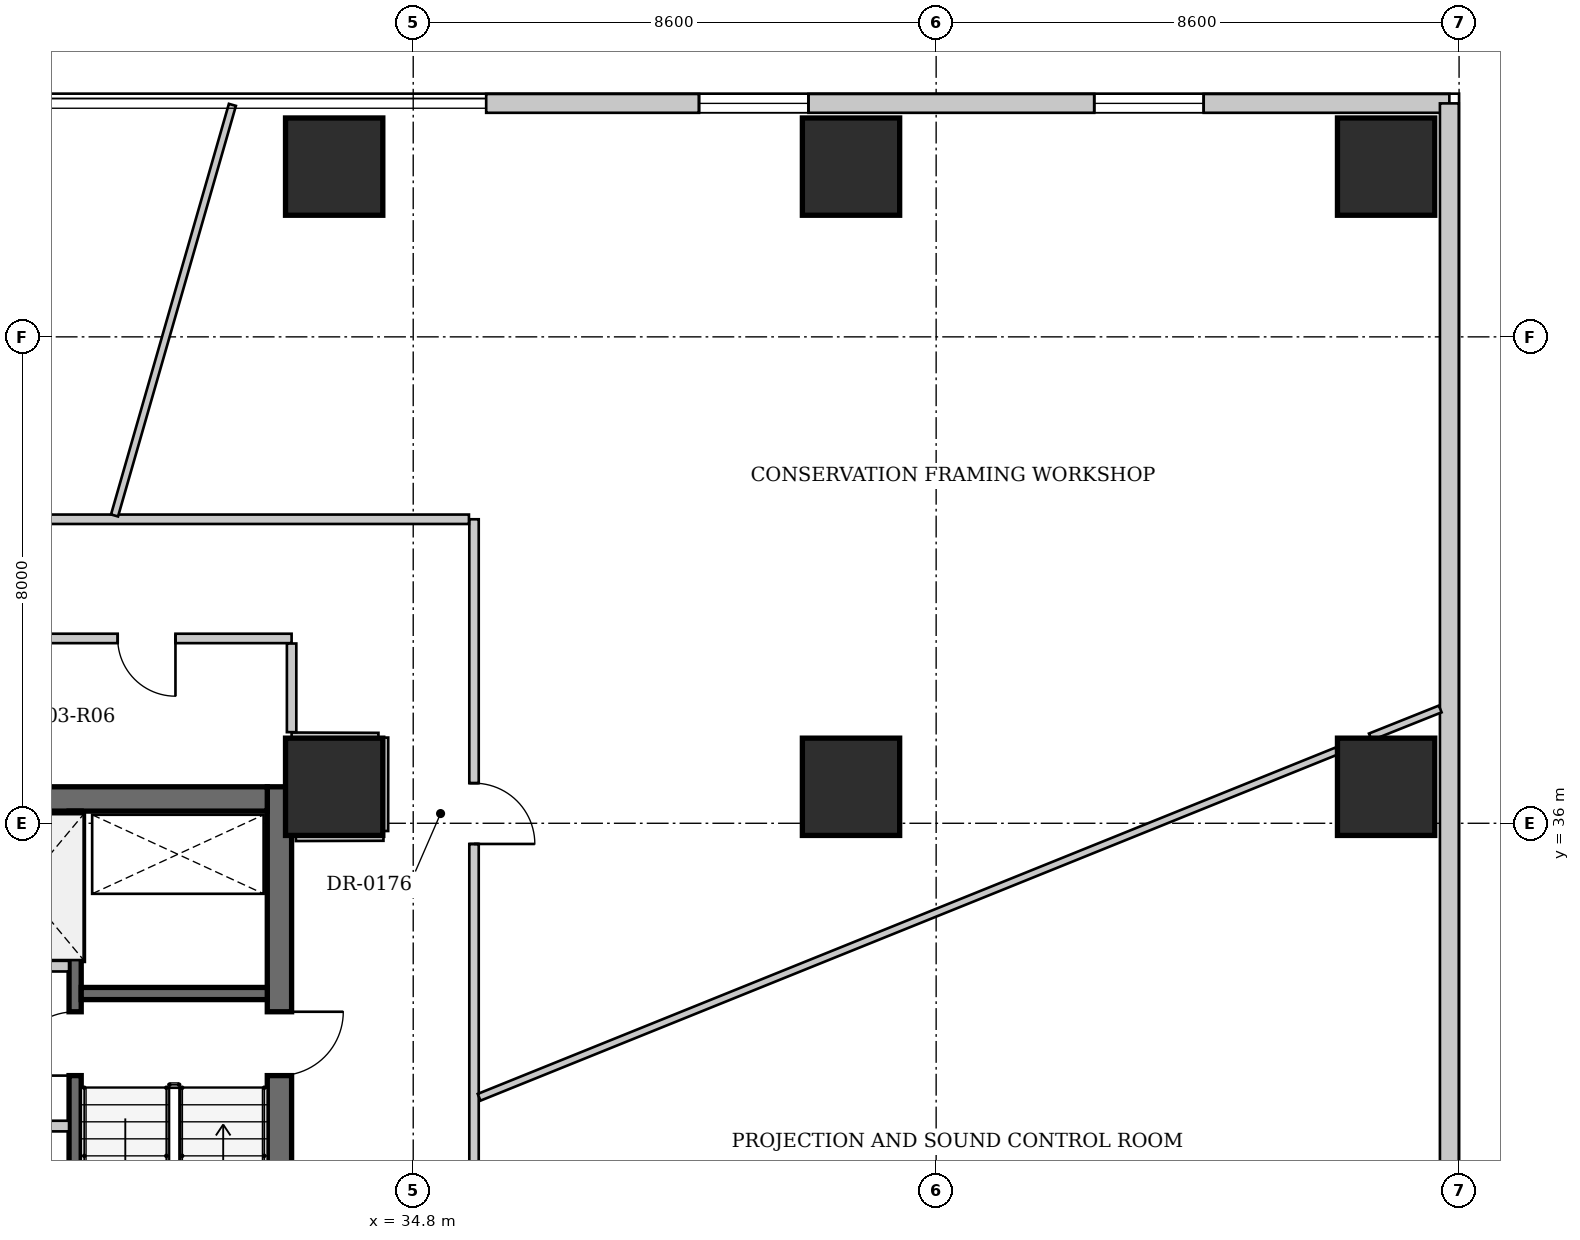
"""IFC4 building model, lengths in metres.
Left out: names, types, materials, properties, quantities, classifications, styles, units other than length and angle.
Written with IfcOpenShell. Run it as: python <this file> out.ifc"""

import sys

from ifc_helpers import new_model, si_unit, direction, frame, frame_2d, origin, origin_2d, place, context, subcontext, project, spatial, rectangle, extrude, source, transform, mapped, element, fill, save


model = new_model("IFC4")
c1 = context("Model", 3, precision=1e-05, world=origin(), true_north=direction((0.0, 1.0)))
c2 = subcontext(c1, "Body", "Model", "MODEL_VIEW")
j1 = project(units=[si_unit("LENGTHUNIT", "METRE"), si_unit("PLANEANGLEUNIT", "RADIAN")], contexts=[c1])
p1 = place(None, origin())
s1 = spatial("IfcSite", under=j1, at=p1, CompositionType="ELEMENT")
p2 = place(p1, origin())
s2 = spatial("IfcBuilding", under=s1, at=p2, CompositionType="ELEMENT")
p3 = place(p2, frame((0.0, 0.0, 14.4)))
s3 = spatial("IfcBuildingStorey", under=s2, at=p3, CompositionType="ELEMENT", Elevation=14.4)
for number, where, z_axis, x_axis in (
    (1, (50.8, 36.6, 0.0), (0.0, 0.0, 1.0), (1.0, 0.0, 0.0)),
    (2, (50.8, 46.8, 0.0), (0.0, 0.0, 1.0), (1.0, 0.0, 0.0)),
    (3, (33.5, 46.8, 0.0), (0.0, 0.0, 1.0), (1.0, 0.0, 0.0)),
    (4, (42.0, 46.8, 0.0), (0.0, 0.0, 1.0), (1.0, 0.0, 0.0)),
    (5, (33.5, 36.6, 0.0), (0.0, 0.0, 1.0), (1.0, 0.0, 0.0)),
    (6, (42.0, 36.6, 0.0), (0.0, 0.0, 1.0), (1.0, 0.0, 0.0)),
):
    element("IfcColumn", number, at=place(p3, frame(where, z_axis=z_axis, x_axis=x_axis)), inside=s3, PredefinedType="COLUMN", context=c2, shape_type="SweptSolid", body=[
        extrude(rectangle(XDim=1.6, YDim=1.6, at=origin_2d()), origin(), (0.0, 0.0, 1.0), 4.25),
    ])
p4 = place(p3, frame((36.0, 47.84, 0.0), z_axis=(0.0, 0.0, 1.0), x_axis=(1.0, 0.0, 0.0)))
e7 = element("IfcWall", 7, at=p4, inside=s3, PredefinedType="SOLIDWALL", context=c2, shape_type="SweptSolid", body=[
    extrude(rectangle(XDim=15.84, YDim=0.31, at=frame_2d((7.92, 0.0))), origin(), (0.0, 0.0, 1.0), 4.05),
])
p5 = place(p4, frame((3.5, 0.0, 0.95)))
e8 = element("IfcOpeningElement", 8, at=p5, cuts=e7, PredefinedType="OPENING", context=c2, shape_type="SweptSolid", body=[
    extrude(rectangle(XDim=1.8, YDim=2.4, at=frame_2d((0.9, 1.2))), frame((0.0, 0.165, 0.0), z_axis=(0.0, -1.0, 0.0), x_axis=(1.0, 0.0, 0.0)), (0.0, 0.0, 1.0), 0.33),
])
p6 = place(p4, frame((10.0, 0.0, 0.95)))
e9 = element("IfcOpeningElement", 9, at=p6, cuts=e7, PredefinedType="OPENING", context=c2, shape_type="SweptSolid", body=[
    extrude(rectangle(XDim=1.8, YDim=2.4, at=frame_2d((0.9, 1.2))), frame((0.0, 0.165, 0.0), z_axis=(0.0, -1.0, 0.0), x_axis=(1.0, 0.0, 0.0)), (0.0, 0.0, 1.0), 0.33),
])
p7 = place(p3, frame((51.84, 47.84, 0.0), z_axis=(0.0, 0.0, 1.0), x_axis=(0.0, -1.0, 0.0)))
e10 = element("IfcWall", 10, at=p7, inside=s3, PredefinedType="SOLIDWALL", context=c2, shape_type="SweptSolid", body=[
    extrude(rectangle(XDim=39.68, YDim=0.31, at=frame_2d((19.84, 0.0))), origin(), (0.0, 0.0, 1.0), 4.05),
])
p8 = place(p3, frame((32.6, 36.6, 0.0), z_axis=(0.0, 0.0, 1.0), x_axis=(0.0, -1.0, 0.0)))
e11 = element("IfcWall", 11, at=p8, inside=s3, PredefinedType="SHEAR", context=c2, shape_type="SweptSolid", body=[
    extrude(rectangle(XDim=10.8, YDim=0.4, at=frame_2d((5.4, 0.0))), origin(), (0.0, 0.0, 1.0), 4.6),
])
p9 = place(p8, frame((3.7, 0.0, 0.0)))
e12 = element("IfcOpeningElement", 12, at=p9, cuts=e11, PredefinedType="OPENING", context=c2, shape_type="SweptSolid", body=[
    extrude(rectangle(XDim=1.05, YDim=2.15, at=frame_2d((0.525, 1.075))), frame((0.0, 0.21, 0.0), z_axis=(0.0, -1.0, 0.0), x_axis=(1.0, 0.0, 0.0)), (0.0, 0.0, 1.0), 0.42),
])
p10 = place(p3, frame((19.6, 36.4, 0.0), z_axis=(0.0, 0.0, 1.0), x_axis=(1.0, 0.0, 0.0)))
e13 = element("IfcWall", 13, at=p10, inside=s3, PredefinedType="SHEAR", context=c2, shape_type="SweptSolid", body=[
    extrude(rectangle(XDim=12.8, YDim=0.4, at=frame_2d((6.4, 0.0))), origin(), (0.0, 0.0, 1.0), 4.6),
])
p11 = place(p3, frame((29.24, 26.2, 0.0), z_axis=(0.0, 0.0, 1.0), x_axis=(0.0, 1.0, 0.0)))
e14 = element("IfcWall", 14, at=p11, inside=s3, PredefinedType="SHEAR", context=c2, shape_type="SweptSolid", body=[
    extrude(rectangle(XDim=10.0, YDim=0.2, at=frame_2d((5.0, 0.0))), origin(), (0.0, 0.0, 1.0), 4.6),
])
p12 = place(p11, frame((5.65, 0.0, 0.0)))
e15 = element("IfcOpeningElement", 15, at=p12, cuts=e14, PredefinedType="OPENING", context=c2, shape_type="SweptSolid", body=[
    extrude(rectangle(XDim=1.05, YDim=2.15, at=frame_2d((0.525, 1.075))), frame((0.0, 0.11, 0.0), z_axis=(0.0, -1.0, 0.0), x_axis=(1.0, 0.0, 0.0)), (0.0, 0.0, 1.0), 0.22),
])
p13 = place(p3, frame((29.34, 33.2, 0.0), z_axis=(0.0, 0.0, 1.0), x_axis=(1.0, 0.0, 0.0)))
e16 = element("IfcWall", 16, at=p13, inside=s3, PredefinedType="SHEAR", context=c2, shape_type="SweptSolid", body=[
    extrude(rectangle(XDim=3.06, YDim=0.2, at=frame_2d((1.53, 0.0))), origin(), (0.0, 0.0, 1.0), 4.6),
])
p14 = place(p3, frame((22.86, 33.65, 0.0), z_axis=(0.0, 0.0, 1.0), x_axis=(1.0, 0.0, 0.0)))
e17 = element("IfcWall", 17, at=p14, inside=s3, PredefinedType="SOLIDWALL", context=c2, shape_type="SweptSolid", body=[
    extrude(rectangle(XDim=6.28, YDim=0.175, at=frame_2d((3.14, 0.0))), origin(), (0.0, 0.0, 1.0), 4.25),
])
p15 = place(p14, frame((0.5, 0.0, 0.0)))
e18 = element("IfcOpeningElement", 18, at=p15, cuts=e17, PredefinedType="OPENING", context=c2, shape_type="SweptSolid", body=[
    extrude(rectangle(XDim=1.05, YDim=2.15, at=frame_2d((0.525, 1.075))), frame((0.0, 0.098, 0.0), z_axis=(0.0, -1.0, 0.0), x_axis=(1.0, 0.0, 0.0)), (0.0, 0.0, 1.0), 0.195),
])
p16 = place(p14, frame((2.76, 0.0, 0.0)))
e19 = element("IfcOpeningElement", 19, at=p16, cuts=e17, PredefinedType="OPENING", context=c2, shape_type="SweptSolid", body=[
    extrude(rectangle(XDim=1.05, YDim=2.15, at=frame_2d((0.525, 1.075))), frame((0.0, 0.098, 0.0), z_axis=(0.0, -1.0, 0.0), x_axis=(1.0, 0.0, 0.0)), (0.0, 0.0, 1.0), 0.195),
])
p17 = place(p14, frame((4.9, 0.0, 0.0)))
e20 = element("IfcOpeningElement", 20, at=p17, cuts=e17, PredefinedType="OPENING", context=c2, shape_type="SweptSolid", body=[
    extrude(rectangle(XDim=1.05, YDim=2.15, at=frame_2d((0.525, 1.075))), frame((0.0, 0.098, 0.0), z_axis=(0.0, -1.0, 0.0), x_axis=(1.0, 0.0, 0.0)), (0.0, 0.0, 1.0), 0.195),
])
p18 = place(p3, frame((22.86, 31.02, 0.0), z_axis=(0.0, 0.0, 1.0), x_axis=(1.0, 0.0, 0.0)))
e21 = element("IfcWall", 21, at=p18, inside=s3, PredefinedType="SOLIDWALL", context=c2, shape_type="SweptSolid", body=[
    extrude(rectangle(XDim=6.28, YDim=0.175, at=frame_2d((3.14, 0.0))), origin(), (0.0, 0.0, 1.0), 4.25),
])
p19 = place(p3, frame((32.8, 39.04, 0.0), z_axis=(0.0, 0.0, 1.0), x_axis=(-1.0, 0.0, 0.0)))
e22 = element("IfcWall", 22, at=p19, inside=s3, PredefinedType="PARTITIONING", context=c2, shape_type="SweptSolid", body=[
    extrude(rectangle(XDim=4.77, YDim=0.155, at=frame_2d((2.385, 0.0))), origin(), (0.0, 0.0, 1.0), 4.25),
])
p20 = place(p19, frame((1.91, 0.0, 0.0)))
e23 = element("IfcOpeningElement", 23, at=p20, cuts=e22, PredefinedType="OPENING", context=c2, shape_type="SweptSolid", body=[
    extrude(rectangle(XDim=0.95, YDim=2.15, at=frame_2d((0.475, 1.075))), frame((0.0, 0.087, 0.0), z_axis=(0.0, -1.0, 0.0), x_axis=(1.0, 0.0, 0.0)), (0.0, 0.0, 1.0), 0.175),
])
p21 = place(p3, frame((35.8, 41.0, 0.0), z_axis=(0.0, 0.0, 1.0), x_axis=(0.0, -1.0, 0.0)))
e24 = element("IfcWall", 24, at=p21, inside=s3, PredefinedType="PARTITIONING", context=c2, shape_type="SweptSolid", body=[
    extrude(rectangle(XDim=14.88, YDim=0.155, at=frame_2d((7.44, 0.0))), origin(), (0.0, 0.0, 1.0), 4.25),
])
p22 = place(p21, frame((4.34, 0.0, 0.0)))
e25 = element("IfcOpeningElement", 25, at=p22, cuts=e24, PredefinedType="OPENING", context=c2, shape_type="SweptSolid", body=[
    extrude(rectangle(XDim=1.0, YDim=2.15, at=frame_2d((0.5, 1.075))), frame((0.0, 0.087, 0.0), z_axis=(0.0, -1.0, 0.0), x_axis=(1.0, 0.0, 0.0)), (0.0, 0.0, 1.0), 0.175),
])
p23 = place(p3, frame((32.87, 35.785, 0.0), z_axis=(0.0, 0.0, 1.0), x_axis=(0.99999584892, 0.002881343971, 0.0)))
e26 = element("IfcWall", 26, at=p23, inside=s3, PredefinedType="PARTITIONING", context=c2, shape_type="SweptSolid", body=[
    extrude(rectangle(XDim=1.44, YDim=0.155, at=frame_2d((0.72, 0.0))), origin(), (0.0, 0.0, 1.0), 4.25),
])
p24 = place(p3, frame((34.311, 35.873, 0.0), z_axis=(0.0, 0.0, 1.0), x_axis=(0.000476644369, 0.999999886405, 0.0)))
e27 = element("IfcWall", 27, at=p24, inside=s3, PredefinedType="PARTITIONING", context=c2, shape_type="SweptSolid", body=[
    extrude(rectangle(XDim=1.537, YDim=0.155, at=frame_2d((0.768, 0.0))), origin(), (0.0, 0.0, 1.0), 4.25),
])
p25 = place(p3, frame((34.228, 37.41, 0.0), z_axis=(0.0, 0.0, 1.0), x_axis=(-0.999993554729, 0.003590334185, 0.0)))
e28 = element("IfcWall", 28, at=p25, inside=s3, PredefinedType="PARTITIONING", context=c2, shape_type="SweptSolid", body=[
    extrude(rectangle(XDim=1.428, YDim=0.155, at=frame_2d((0.714, 0.0))), origin(), (0.0, 0.0, 1.0), 4.25),
])
p26 = place(p3, frame((32.8, 37.499, 0.0), z_axis=(0.0, 0.0, 1.0), x_axis=(0.0, 1.0, 0.0)))
e29 = element("IfcWall", 29, at=p26, inside=s3, PredefinedType="PARTITIONING", context=c2, shape_type="SweptSolid", body=[
    extrude(rectangle(XDim=1.458, YDim=0.155, at=frame_2d((0.729, 0.0))), origin(), (0.0, 0.0, 1.0), 4.25),
])
p27 = place(p3, frame((21.684, 41.0, 0.0), z_axis=(0.0, 0.0, 1.0), x_axis=(1.0, 0.0, 0.0)))
e30 = element("IfcWall", 30, at=p27, inside=s3, PredefinedType="PARTITIONING", context=c2, shape_type="SweptSolid", body=[
    extrude(rectangle(XDim=14.033, YDim=0.155, at=frame_2d((7.017, 0.0))), origin(), (0.0, 0.0, 1.0), 4.25),
])
p28 = place(p3, frame((35.884, 31.494, 0.0), z_axis=(0.0, 0.0, 1.0), x_axis=(0.927254266792, 0.374432269865, 0.0)))
e31 = element("IfcWall", 31, at=p28, inside=s3, PredefinedType="PARTITIONING", context=c2, shape_type="SweptSolid", body=[
    extrude(rectangle(XDim=15.213, YDim=0.12, at=frame_2d((7.606, 0.0))), origin(), (0.0, 0.0, 1.0), 3.37),
])
p29 = place(p3, frame((50.54, 37.42, 0.0), z_axis=(0.0, 0.0, 1.0), x_axis=(0.928476690885, 0.371390676354, 0.0)))
e32 = element("IfcWall", 32, at=p29, inside=s3, PredefinedType="PARTITIONING", context=c2, shape_type="SweptSolid", body=[
    extrude(rectangle(XDim=1.239, YDim=0.12, at=frame_2d((0.619, 0.0))), origin(), (0.0, 0.0, 1.0), 4.25),
])
p30 = place(p3, frame((29.888, 41.062, 0.0), z_axis=(0.0, 0.0, 1.0), x_axis=(0.275863681282, 0.961196769319, 0.0)))
e33 = element("IfcWall", 33, at=p30, inside=s3, PredefinedType="PARTITIONING", context=c2, shape_type="SweptSolid", body=[
    extrude(rectangle(XDim=7.026, YDim=0.12, at=frame_2d((3.513, 0.0))), origin(), (0.0, 0.0, 1.0), 4.25),
])
m1 = source(origin(), c2, "Body", "SweptSolid", [
    extrude(rectangle(XDim=1.8, YDim=2.4, at=frame_2d((0.9, 1.2))), frame((0.0, 0.03, 0.0), z_axis=(0.0, -1.0, 0.0), x_axis=(1.0, 0.0, 0.0)), (0.0, 0.0, 1.0), 0.06),
])
p31 = place(p5, origin())
e34 = element("IfcWindow", 34, at=p31, inside=s3, PartitioningType="SINGLE_PANEL", PredefinedType="WINDOW", context=c2, shape_type="MappedRepresentation", body=[
    mapped(m1, transform((0.0, 0.0, 0.0), x_axis=(1.0, 0.0, 0.0), y_axis=(0.0, 1.0, 0.0), z_axis=(0.0, 0.0, 1.0), scale=1.0)),
])
fill(e8, e34)
p32 = place(p6, origin())
e35 = element("IfcWindow", 35, at=p32, inside=s3, PartitioningType="SINGLE_PANEL", PredefinedType="WINDOW", context=c2, shape_type="MappedRepresentation", body=[
    mapped(m1, transform((0.0, 0.0, 0.0), x_axis=(1.0, 0.0, 0.0), y_axis=(0.0, 1.0, 0.0), z_axis=(0.0, 0.0, 1.0), scale=1.0)),
])
fill(e9, e35)
m2 = source(origin(), c2, "Body", "SweptSolid", [
    extrude(rectangle(XDim=1.05, YDim=2.15, at=frame_2d((0.525, 1.075))), frame((0.0, 0.025, 0.0), z_axis=(0.0, -1.0, 0.0), x_axis=(1.0, 0.0, 0.0)), (0.0, 0.0, 1.0), 0.05),
])
p33 = place(p9, origin())
e36 = element("IfcDoor", 36, at=p33, inside=s3, OperationType="SINGLE_SWING_LEFT", PredefinedType="DOOR", context=c2, shape_type="MappedRepresentation", body=[
    mapped(m2, transform((0.0, 0.0, 0.0), x_axis=(1.0, 0.0, 0.0), y_axis=(0.0, 1.0, 0.0), z_axis=(0.0, 0.0, 1.0), scale=1.0)),
])
fill(e12, e36)
p34 = place(p12, origin())
e37 = element("IfcDoor", 37, at=p34, inside=s3, OperationType="SINGLE_SWING_LEFT", PredefinedType="DOOR", context=c2, shape_type="MappedRepresentation", body=[
    mapped(m2, transform((0.0, 0.0, 0.0), x_axis=(1.0, 0.0, 0.0), y_axis=(0.0, 1.0, 0.0), z_axis=(0.0, 0.0, 1.0), scale=1.0)),
])
fill(e15, e37)
m3 = source(origin(), c2, "Body", "SweptSolid", [
    extrude(rectangle(XDim=0.95, YDim=2.15, at=frame_2d((0.475, 1.075))), frame((0.0, 0.025, 0.0), z_axis=(0.0, -1.0, 0.0), x_axis=(1.0, 0.0, 0.0)), (0.0, 0.0, 1.0), 0.05),
])
p35 = place(p20, origin())
e38 = element("IfcDoor", 38, at=p35, inside=s3, OperationType="SINGLE_SWING_LEFT", PredefinedType="DOOR", context=c2, shape_type="MappedRepresentation", body=[
    mapped(m3, transform((0.0, 0.0, 0.0), x_axis=(1.0, 0.0, 0.0), y_axis=(0.0, 1.0, 0.0), z_axis=(0.0, 0.0, 1.0), scale=1.0)),
])
fill(e23, e38)
m4 = source(origin(), c2, "Body", "SweptSolid", [
    extrude(rectangle(XDim=1.0, YDim=2.15, at=frame_2d((0.5, 1.075))), frame((0.0, 0.025, 0.0), z_axis=(0.0, -1.0, 0.0), x_axis=(1.0, 0.0, 0.0)), (0.0, 0.0, 1.0), 0.05),
])
p36 = place(p22, origin())
e39 = element("IfcDoor", 39, at=p36, inside=s3, OperationType="SINGLE_SWING_RIGHT", PredefinedType="DOOR", context=c2, shape_type="MappedRepresentation", body=[
    mapped(m4, transform((0.0, 0.0, 0.0), x_axis=(1.0, 0.0, 0.0), y_axis=(0.0, 1.0, 0.0), z_axis=(0.0, 0.0, 1.0), scale=1.0)),
])
fill(e25, e39)
save(model, sys.argv[1])
